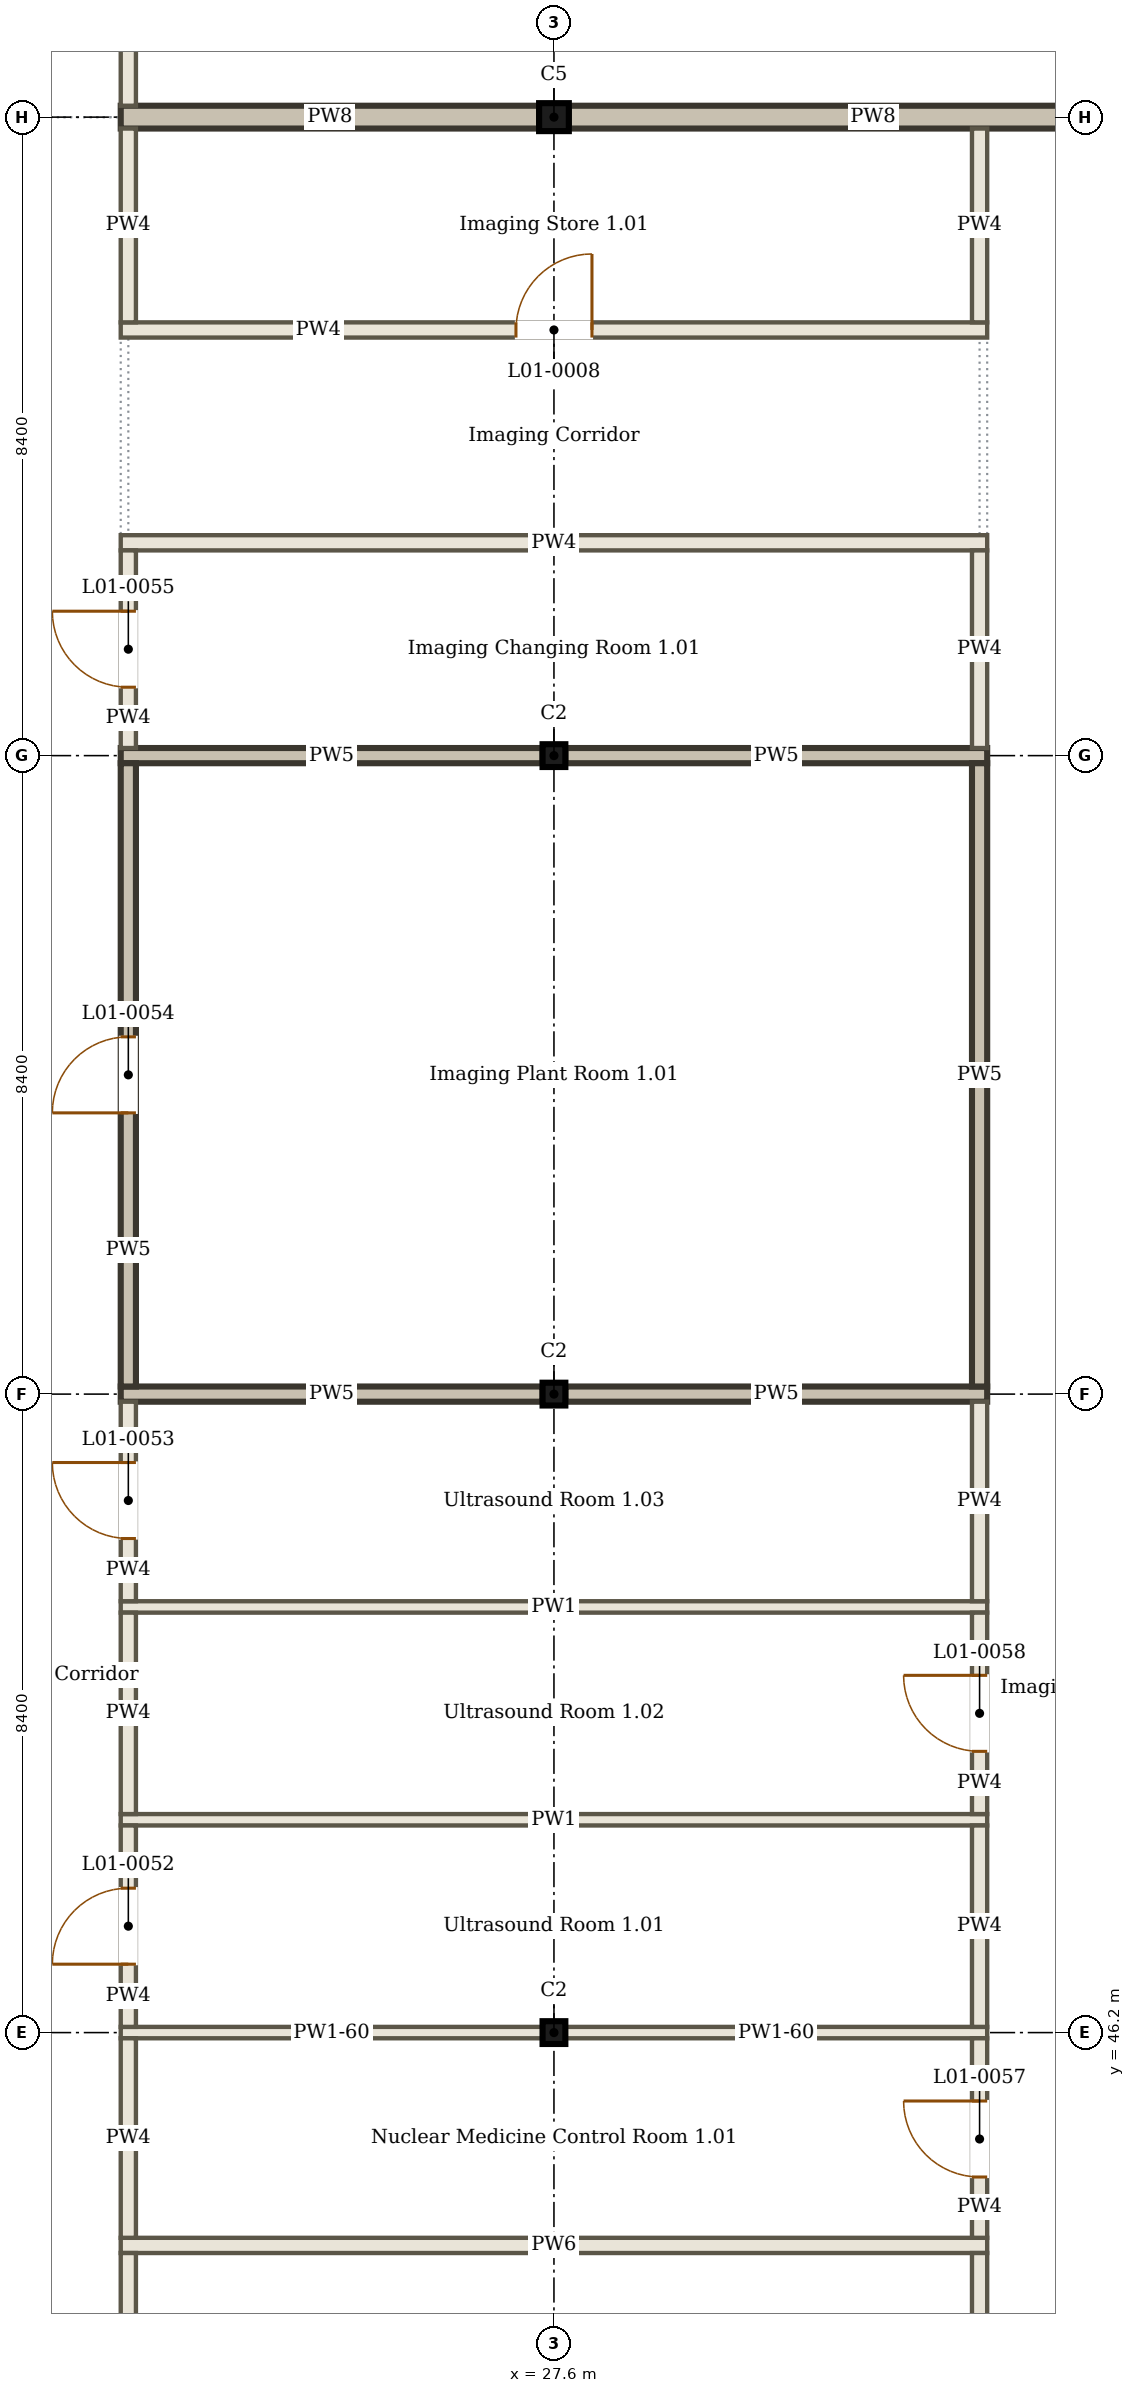
"""IFC4 building model, lengths in metres.
Left out: names, types, materials, properties, quantities, classifications, styles, units other than length and angle.
Written with IfcOpenShell. Run it as: python <this file> out.ifc"""

import sys

from ifc_helpers import new_model, si_unit, direction, frame, frame_2d, origin, origin_2d, place, context, subcontext, project, spatial, rectangle, i_section, extrude, element, fill, save


model = new_model("IFC4")
c1 = context("Model", 3, precision=1e-05, world=origin(), true_north=direction((0.0, 1.0)))
c2 = subcontext(c1, "Body", "Model", "MODEL_VIEW")
j1 = project(units=[si_unit("LENGTHUNIT", "METRE"), si_unit("PLANEANGLEUNIT", "RADIAN")], contexts=[c1])
p1 = place(None, origin())
s1 = spatial("IfcSite", under=j1, at=p1, CompositionType="ELEMENT")
p2 = place(p1, origin())
s2 = spatial("IfcBuilding", under=s1, at=p2, CompositionType="ELEMENT")
p3 = place(p2, frame((0.0, 0.0, 4.5)))
s3 = spatial("IfcBuildingStorey", under=s2, at=p3, CompositionType="ELEMENT", Elevation=4.5)
for number, where, z_axis, x_axis in (
    (1, (27.6, 46.2, 0.0), (0.0, 0.0, 1.0), (1.0, 0.0, 0.0)),
    (2, (27.6, 54.6, 0.0), (0.0, 0.0, 1.0), (1.0, 0.0, 0.0)),
    (3, (27.6, 63.0, 0.0), (0.0, 0.0, 1.0), (1.0, 0.0, 0.0)),
):
    element("IfcColumn", number, at=place(p3, frame(where, z_axis=z_axis, x_axis=x_axis)), inside=s3, PredefinedType="COLUMN", context=c2, shape_type="SweptSolid", body=[
        extrude(i_section(OverallWidth=0.3, OverallDepth=0.3, WebThickness=0.011, FlangeThickness=0.019, FilletRadius=0.027, at=origin_2d()), origin(), (0.0, 0.0, 1.0), 4.5),
    ])
p4 = place(p3, frame((27.6, 71.4, 0.0), z_axis=(0.0, 0.0, 1.0), x_axis=(1.0, 0.0, 0.0)))
e4 = element("IfcColumn", 4, at=p4, inside=s3, PredefinedType="COLUMN", context=c2, shape_type="SweptSolid", body=[
    extrude(i_section(OverallWidth=0.391, OverallDepth=0.368, WebThickness=0.015, FlangeThickness=0.024, FilletRadius=0.027, at=origin_2d()), origin(), (0.0, 0.0, 1.0), 4.5),
])
p5 = place(p3, frame((21.9, 43.4, 0.0), z_axis=(0.0, 0.0, 1.0), x_axis=(1.0, 0.0, 0.0)))
e5 = element("IfcWall", 5, at=p5, inside=s3, PredefinedType="PARTITIONING", context=c2, shape_type="SweptSolid", body=[
    extrude(rectangle(XDim=11.4, YDim=0.2, at=frame_2d((5.7, 0.0))), origin(), (0.0, 0.0, 1.0), 4.1),
])
for number, where, z_axis, x_axis in (
    (6, (21.9, 46.2, 0.0), (0.0, 0.0, 1.0), (1.0, 0.0, 0.0)),
    (7, (27.75, 46.2, 0.0), (0.0, 0.0, 1.0), (1.0, 0.0, 0.0)),
):
    element("IfcWall", number, at=place(p3, frame(where, z_axis=z_axis, x_axis=x_axis)), inside=s3, PredefinedType="PARTITIONING", context=c2, shape_type="SweptSolid", body=[
        extrude(rectangle(XDim=5.55, YDim=0.15, at=frame_2d((2.775, 0.0))), origin(), (0.0, 0.0, 1.0), 4.044),
    ])
for number, where, z_axis, x_axis in (
    (8, (21.9, 49.0, 0.0), (0.0, 0.0, 1.0), (1.0, 0.0, 0.0)),
    (9, (21.9, 51.8, 0.0), (0.0, 0.0, 1.0), (1.0, 0.0, 0.0)),
):
    element("IfcWall", number, at=place(p3, frame(where, z_axis=z_axis, x_axis=x_axis)), inside=s3, PredefinedType="PARTITIONING", context=c2, shape_type="SweptSolid", body=[
        extrude(rectangle(XDim=11.4, YDim=0.15, at=frame_2d((5.7, 0.0))), origin(), (0.0, 0.0, 1.0), 4.1),
    ])
for number, where, z_axis, x_axis in (
    (10, (21.9, 54.6, 0.0), (0.0, 0.0, 1.0), (1.0, 0.0, 0.0)),
    (11, (27.75, 54.6, 0.0), (0.0, 0.0, 1.0), (1.0, 0.0, 0.0)),
    (12, (21.9, 63.0, 0.0), (0.0, 0.0, 1.0), (1.0, 0.0, 0.0)),
    (13, (27.75, 63.0, 0.0), (0.0, 0.0, 1.0), (1.0, 0.0, 0.0)),
):
    element("IfcWall", number, at=place(p3, frame(where, z_axis=z_axis, x_axis=x_axis)), inside=s3, PredefinedType="SOLIDWALL", context=c2, shape_type="SweptSolid", body=[
        extrude(rectangle(XDim=5.55, YDim=0.2, at=frame_2d((2.775, 0.0))), origin(), (0.0, 0.0, 1.0), 4.044),
    ])
p6 = place(p3, frame((21.9, 65.8, 0.0), z_axis=(0.0, 0.0, 1.0), x_axis=(1.0, 0.0, 0.0)))
e14 = element("IfcWall", 14, at=p6, inside=s3, PredefinedType="PARTITIONING", context=c2, shape_type="SweptSolid", body=[
    extrude(rectangle(XDim=11.4, YDim=0.2, at=frame_2d((5.7, 0.0))), origin(), (0.0, 0.0, 1.0), 4.1),
])
p7 = place(p3, frame((21.9, 68.6, 0.0), z_axis=(0.0, 0.0, 1.0), x_axis=(1.0, 0.0, 0.0)))
e15 = element("IfcWall", 15, at=p7, inside=s3, PredefinedType="PARTITIONING", context=c2, shape_type="SweptSolid", body=[
    extrude(rectangle(XDim=11.4, YDim=0.2, at=frame_2d((5.7, 0.0))), origin(), (0.0, 0.0, 1.0), 4.1),
])
p8 = place(p7, frame((5.2, 0.0, 0.0)))
e16 = element("IfcOpeningElement", 16, at=p8, cuts=e15, PredefinedType="OPENING", context=c2, shape_type="SweptSolid", body=[
    extrude(rectangle(XDim=1.0, YDim=2.1, at=frame_2d((0.5, 1.05))), frame((0.0, 0.11, 0.0), z_axis=(0.0, -1.0, 0.0), x_axis=(1.0, 0.0, 0.0)), (0.0, 0.0, 1.0), 0.22),
])
p9 = place(p3, frame((21.9, 71.4, 0.0), z_axis=(0.0, 0.0, 1.0), x_axis=(1.0, 0.0, 0.0)))
e17 = element("IfcWall", 17, at=p9, inside=s3, PredefinedType="SOLIDWALL", context=c2, shape_type="SweptSolid", body=[
    extrude(rectangle(XDim=5.505, YDim=0.3, at=frame_2d((2.752, 0.0))), origin(), (0.0, 0.0, 1.0), 3.85),
])
p10 = place(p3, frame((27.795, 71.4, 0.0), z_axis=(0.0, 0.0, 1.0), x_axis=(1.0, 0.0, 0.0)))
e18 = element("IfcWall", 18, at=p10, inside=s3, PredefinedType="SOLIDWALL", context=c2, shape_type="SweptSolid", body=[
    extrude(rectangle(XDim=8.009, YDim=0.3, at=frame_2d((4.004, 0.0))), origin(), (0.0, 0.0, 1.0), 3.85),
])
p11 = place(p3, frame((22.0, 37.9, 0.0), z_axis=(0.0, 0.0, 1.0), x_axis=(0.0, 1.0, 0.0)))
e19 = element("IfcWall", 19, at=p11, inside=s3, PredefinedType="PARTITIONING", context=c2, shape_type="SweptSolid", body=[
    extrude(rectangle(XDim=5.4, YDim=0.2, at=frame_2d((2.7, 0.0))), origin(), (0.0, 0.0, 1.0), 4.35),
])
p12 = place(p11, frame((2.1, 0.0, 0.0)))
e20 = element("IfcOpeningElement", 20, at=p12, cuts=e19, PredefinedType="OPENING", context=c2, shape_type="SweptSolid", body=[
    extrude(rectangle(XDim=1.2, YDim=2.1, at=frame_2d((0.6, 1.05))), frame((0.0, 0.11, 0.0), z_axis=(0.0, -1.0, 0.0), x_axis=(1.0, 0.0, 0.0)), (0.0, 0.0, 1.0), 0.22),
])
p13 = place(p3, frame((22.0, 43.5, 0.0), z_axis=(0.0, 0.0, 1.0), x_axis=(0.0, 1.0, 0.0)))
e21 = element("IfcWall", 21, at=p13, inside=s3, PredefinedType="PARTITIONING", context=c2, shape_type="SweptSolid", body=[
    extrude(rectangle(XDim=2.625, YDim=0.2, at=frame_2d((1.312, 0.0))), origin(), (0.0, 0.0, 1.0), 4.044),
])
p14 = place(p3, frame((22.0, 46.275, 0.0), z_axis=(0.0, 0.0, 1.0), x_axis=(0.0, 1.0, 0.0)))
e22 = element("IfcWall", 22, at=p14, inside=s3, PredefinedType="PARTITIONING", context=c2, shape_type="SweptSolid", body=[
    extrude(rectangle(XDim=2.65, YDim=0.2, at=frame_2d((1.325, 0.0))), origin(), (0.0, 0.0, 1.0), 4.044),
])
p15 = place(p14, frame((0.825, 0.0, 0.0)))
e23 = element("IfcOpeningElement", 23, at=p15, cuts=e22, PredefinedType="OPENING", context=c2, shape_type="SweptSolid", body=[
    extrude(rectangle(XDim=1.0, YDim=2.1, at=frame_2d((0.5, 1.05))), frame((0.0, 0.11, 0.0), z_axis=(0.0, -1.0, 0.0), x_axis=(1.0, 0.0, 0.0)), (0.0, 0.0, 1.0), 0.22),
])
p16 = place(p3, frame((22.0, 49.075, 0.0), z_axis=(0.0, 0.0, 1.0), x_axis=(0.0, 1.0, 0.0)))
e24 = element("IfcWall", 24, at=p16, inside=s3, PredefinedType="PARTITIONING", context=c2, shape_type="SweptSolid", body=[
    extrude(rectangle(XDim=2.65, YDim=0.2, at=frame_2d((1.325, 0.0))), origin(), (0.0, 0.0, 1.0), 4.35),
])
p17 = place(p3, frame((22.0, 51.875, 0.0), z_axis=(0.0, 0.0, 1.0), x_axis=(0.0, 1.0, 0.0)))
e25 = element("IfcWall", 25, at=p17, inside=s3, PredefinedType="PARTITIONING", context=c2, shape_type="SweptSolid", body=[
    extrude(rectangle(XDim=2.625, YDim=0.2, at=frame_2d((1.312, 0.0))), origin(), (0.0, 0.0, 1.0), 4.35),
])
p18 = place(p17, frame((0.825, 0.0, 0.0)))
e26 = element("IfcOpeningElement", 26, at=p18, cuts=e25, PredefinedType="OPENING", context=c2, shape_type="SweptSolid", body=[
    extrude(rectangle(XDim=1.0, YDim=2.1, at=frame_2d((0.5, 1.05))), frame((0.0, 0.11, 0.0), z_axis=(0.0, -1.0, 0.0), x_axis=(1.0, 0.0, 0.0)), (0.0, 0.0, 1.0), 0.22),
])
p19 = place(p3, frame((22.0, 54.7, 0.0), z_axis=(0.0, 0.0, 1.0), x_axis=(0.0, 1.0, 0.0)))
e27 = element("IfcWall", 27, at=p19, inside=s3, PredefinedType="SOLIDWALL", context=c2, shape_type="SweptSolid", body=[
    extrude(rectangle(XDim=8.2, YDim=0.2, at=frame_2d((4.1, 0.0))), origin(), (0.0, 0.0, 1.0), 4.35),
])
p20 = place(p19, frame((3.6, 0.0, 0.0)))
e28 = element("IfcOpeningElement", 28, at=p20, cuts=e27, PredefinedType="OPENING", context=c2, shape_type="SweptSolid", body=[
    extrude(rectangle(XDim=1.0, YDim=2.1, at=frame_2d((0.5, 1.05))), frame((0.0, 0.11, 0.0), z_axis=(0.0, -1.0, 0.0), x_axis=(1.0, 0.0, 0.0)), (0.0, 0.0, 1.0), 0.22),
])
p21 = place(p3, frame((22.0, 63.1, 0.0), z_axis=(0.0, 0.0, 1.0), x_axis=(0.0, 1.0, 0.0)))
e29 = element("IfcWall", 29, at=p21, inside=s3, PredefinedType="PARTITIONING", context=c2, shape_type="SweptSolid", body=[
    extrude(rectangle(XDim=2.6, YDim=0.2, at=frame_2d((1.3, 0.0))), origin(), (0.0, 0.0, 1.0), 4.35),
])
p22 = place(p21, frame((0.8, 0.0, 0.0)))
e30 = element("IfcOpeningElement", 30, at=p22, cuts=e29, PredefinedType="OPENING", context=c2, shape_type="SweptSolid", body=[
    extrude(rectangle(XDim=1.0, YDim=2.1, at=frame_2d((0.5, 1.05))), frame((0.0, 0.11, 0.0), z_axis=(0.0, -1.0, 0.0), x_axis=(1.0, 0.0, 0.0)), (0.0, 0.0, 1.0), 0.22),
])
p23 = place(p3, frame((22.0, 68.7, 0.0), z_axis=(0.0, 0.0, 1.0), x_axis=(0.0, 1.0, 0.0)))
e31 = element("IfcWall", 31, at=p23, inside=s3, PredefinedType="PARTITIONING", context=c2, shape_type="SweptSolid", body=[
    extrude(rectangle(XDim=2.55, YDim=0.2, at=frame_2d((1.275, 0.0))), origin(), (0.0, 0.0, 1.0), 4.35),
])
p24 = place(p3, frame((22.0, 71.55, 0.0), z_axis=(0.0, 0.0, 1.0), x_axis=(0.0, 1.0, 0.0)))
e32 = element("IfcWall", 32, at=p24, inside=s3, PredefinedType="PARTITIONING", context=c2, shape_type="SweptSolid", body=[
    extrude(rectangle(XDim=8.175, YDim=0.2, at=frame_2d((4.087, 0.0))), origin(), (0.0, 0.0, 1.0), 3.8),
])
p25 = place(p24, frame((3.45, 0.0, 0.0)))
e33 = element("IfcOpeningElement", 33, at=p25, cuts=e32, PredefinedType="OPENING", context=c2, shape_type="SweptSolid", body=[
    extrude(rectangle(XDim=1.0, YDim=2.1, at=frame_2d((0.5, 1.05))), frame((0.0, 0.11, 0.0), z_axis=(0.0, -1.0, 0.0), x_axis=(1.0, 0.0, 0.0)), (0.0, 0.0, 1.0), 0.22),
])
p26 = place(p3, frame((33.2, 37.9, 0.0), z_axis=(0.0, 0.0, 1.0), x_axis=(0.0, 1.0, 0.0)))
e34 = element("IfcWall", 34, at=p26, inside=s3, PredefinedType="PARTITIONING", context=c2, shape_type="SweptSolid", body=[
    extrude(rectangle(XDim=5.4, YDim=0.2, at=frame_2d((2.7, 0.0))), origin(), (0.0, 0.0, 1.0), 4.35),
])
p27 = place(p3, frame((33.2, 43.5, 0.0), z_axis=(0.0, 0.0, 1.0), x_axis=(0.0, 1.0, 0.0)))
e35 = element("IfcWall", 35, at=p27, inside=s3, PredefinedType="PARTITIONING", context=c2, shape_type="SweptSolid", body=[
    extrude(rectangle(XDim=2.625, YDim=0.2, at=frame_2d((1.312, 0.0))), origin(), (0.0, 0.0, 1.0), 4.044),
])
p28 = place(p27, frame((0.8, 0.0, 0.0)))
e36 = element("IfcOpeningElement", 36, at=p28, cuts=e35, PredefinedType="OPENING", context=c2, shape_type="SweptSolid", body=[
    extrude(rectangle(XDim=1.0, YDim=2.1, at=frame_2d((0.5, 1.05))), frame((0.0, 0.11, 0.0), z_axis=(0.0, -1.0, 0.0), x_axis=(1.0, 0.0, 0.0)), (0.0, 0.0, 1.0), 0.22),
])
p29 = place(p3, frame((33.2, 46.275, 0.0), z_axis=(0.0, 0.0, 1.0), x_axis=(0.0, 1.0, 0.0)))
e37 = element("IfcWall", 37, at=p29, inside=s3, PredefinedType="PARTITIONING", context=c2, shape_type="SweptSolid", body=[
    extrude(rectangle(XDim=2.65, YDim=0.2, at=frame_2d((1.325, 0.0))), origin(), (0.0, 0.0, 1.0), 4.044),
])
p30 = place(p3, frame((33.2, 49.075, 0.0), z_axis=(0.0, 0.0, 1.0), x_axis=(0.0, 1.0, 0.0)))
e38 = element("IfcWall", 38, at=p30, inside=s3, PredefinedType="PARTITIONING", context=c2, shape_type="SweptSolid", body=[
    extrude(rectangle(XDim=2.65, YDim=0.2, at=frame_2d((1.325, 0.0))), origin(), (0.0, 0.0, 1.0), 4.35),
])
p31 = place(p30, frame((0.825, 0.0, 0.0)))
e39 = element("IfcOpeningElement", 39, at=p31, cuts=e38, PredefinedType="OPENING", context=c2, shape_type="SweptSolid", body=[
    extrude(rectangle(XDim=1.0, YDim=2.1, at=frame_2d((0.5, 1.05))), frame((0.0, 0.11, 0.0), z_axis=(0.0, -1.0, 0.0), x_axis=(1.0, 0.0, 0.0)), (0.0, 0.0, 1.0), 0.22),
])
p32 = place(p3, frame((33.2, 51.875, 0.0), z_axis=(0.0, 0.0, 1.0), x_axis=(0.0, 1.0, 0.0)))
e40 = element("IfcWall", 40, at=p32, inside=s3, PredefinedType="PARTITIONING", context=c2, shape_type="SweptSolid", body=[
    extrude(rectangle(XDim=2.625, YDim=0.2, at=frame_2d((1.312, 0.0))), origin(), (0.0, 0.0, 1.0), 4.35),
])
p33 = place(p3, frame((33.2, 54.7, 0.0), z_axis=(0.0, 0.0, 1.0), x_axis=(0.0, 1.0, 0.0)))
e41 = element("IfcWall", 41, at=p33, inside=s3, PredefinedType="SOLIDWALL", context=c2, shape_type="SweptSolid", body=[
    extrude(rectangle(XDim=8.2, YDim=0.2, at=frame_2d((4.1, 0.0))), origin(), (0.0, 0.0, 1.0), 4.35),
])
p34 = place(p3, frame((33.2, 63.1, 0.0), z_axis=(0.0, 0.0, 1.0), x_axis=(0.0, 1.0, 0.0)))
e42 = element("IfcWall", 42, at=p34, inside=s3, PredefinedType="PARTITIONING", context=c2, shape_type="SweptSolid", body=[
    extrude(rectangle(XDim=2.6, YDim=0.2, at=frame_2d((1.3, 0.0))), origin(), (0.0, 0.0, 1.0), 4.35),
])
p35 = place(p3, frame((33.2, 68.7, 0.0), z_axis=(0.0, 0.0, 1.0), x_axis=(0.0, 1.0, 0.0)))
e43 = element("IfcWall", 43, at=p35, inside=s3, PredefinedType="PARTITIONING", context=c2, shape_type="SweptSolid", body=[
    extrude(rectangle(XDim=2.55, YDim=0.2, at=frame_2d((1.275, 0.0))), origin(), (0.0, 0.0, 1.0), 4.35),
])
p36 = place(p8, origin())
e44 = element("IfcDoor", 44, at=p36, inside=s3, OperationType="SINGLE_SWING_RIGHT", PredefinedType="DOOR", context=c2, shape_type="SweptSolid", body=[
    extrude(rectangle(XDim=1.0, YDim=2.1, at=frame_2d((0.5, 1.05))), frame((0.0, 0.025, 0.0), z_axis=(0.0, -1.0, 0.0), x_axis=(1.0, 0.0, 0.0)), (0.0, 0.0, 1.0), 0.05),
])
fill(e16, e44)
p37 = place(p15, origin())
e45 = element("IfcDoor", 45, at=p37, inside=s3, OperationType="SINGLE_SWING_LEFT", PredefinedType="DOOR", context=c2, shape_type="SweptSolid", body=[
    extrude(rectangle(XDim=1.0, YDim=2.1, at=frame_2d((0.5, 1.05))), frame((0.0, 0.025, 0.0), z_axis=(0.0, -1.0, 0.0), x_axis=(1.0, 0.0, 0.0)), (0.0, 0.0, 1.0), 0.05),
])
fill(e23, e45)
p38 = place(p18, origin())
e46 = element("IfcDoor", 46, at=p38, inside=s3, OperationType="SINGLE_SWING_RIGHT", PredefinedType="DOOR", context=c2, shape_type="SweptSolid", body=[
    extrude(rectangle(XDim=1.0, YDim=2.1, at=frame_2d((0.5, 1.05))), frame((0.0, 0.025, 0.0), z_axis=(0.0, -1.0, 0.0), x_axis=(1.0, 0.0, 0.0)), (0.0, 0.0, 1.0), 0.05),
])
fill(e26, e46)
p39 = place(p20, origin())
e47 = element("IfcDoor", 47, at=p39, inside=s3, OperationType="SINGLE_SWING_LEFT", PredefinedType="DOOR", context=c2, shape_type="SweptSolid", body=[
    extrude(rectangle(XDim=1.0, YDim=2.1, at=frame_2d((0.5, 1.05))), frame((0.0, 0.025, 0.0), z_axis=(0.0, -1.0, 0.0), x_axis=(1.0, 0.0, 0.0)), (0.0, 0.0, 1.0), 0.05),
])
fill(e28, e47)
p40 = place(p22, origin())
e48 = element("IfcDoor", 48, at=p40, inside=s3, OperationType="SINGLE_SWING_RIGHT", PredefinedType="DOOR", context=c2, shape_type="SweptSolid", body=[
    extrude(rectangle(XDim=1.0, YDim=2.1, at=frame_2d((0.5, 1.05))), frame((0.0, 0.025, 0.0), z_axis=(0.0, -1.0, 0.0), x_axis=(1.0, 0.0, 0.0)), (0.0, 0.0, 1.0), 0.05),
])
fill(e30, e48)
p41 = place(p28, origin())
e49 = element("IfcDoor", 49, at=p41, inside=s3, OperationType="SINGLE_SWING_RIGHT", PredefinedType="DOOR", context=c2, shape_type="SweptSolid", body=[
    extrude(rectangle(XDim=1.0, YDim=2.1, at=frame_2d((0.5, 1.05))), frame((0.0, 0.025, 0.0), z_axis=(0.0, -1.0, 0.0), x_axis=(1.0, 0.0, 0.0)), (0.0, 0.0, 1.0), 0.05),
])
fill(e36, e49)
p42 = place(p31, origin())
e50 = element("IfcDoor", 50, at=p42, inside=s3, OperationType="SINGLE_SWING_RIGHT", PredefinedType="DOOR", context=c2, shape_type="SweptSolid", body=[
    extrude(rectangle(XDim=1.0, YDim=2.1, at=frame_2d((0.5, 1.05))), frame((0.0, 0.025, 0.0), z_axis=(0.0, -1.0, 0.0), x_axis=(1.0, 0.0, 0.0)), (0.0, 0.0, 1.0), 0.05),
])
fill(e39, e50)
save(model, sys.argv[1])
